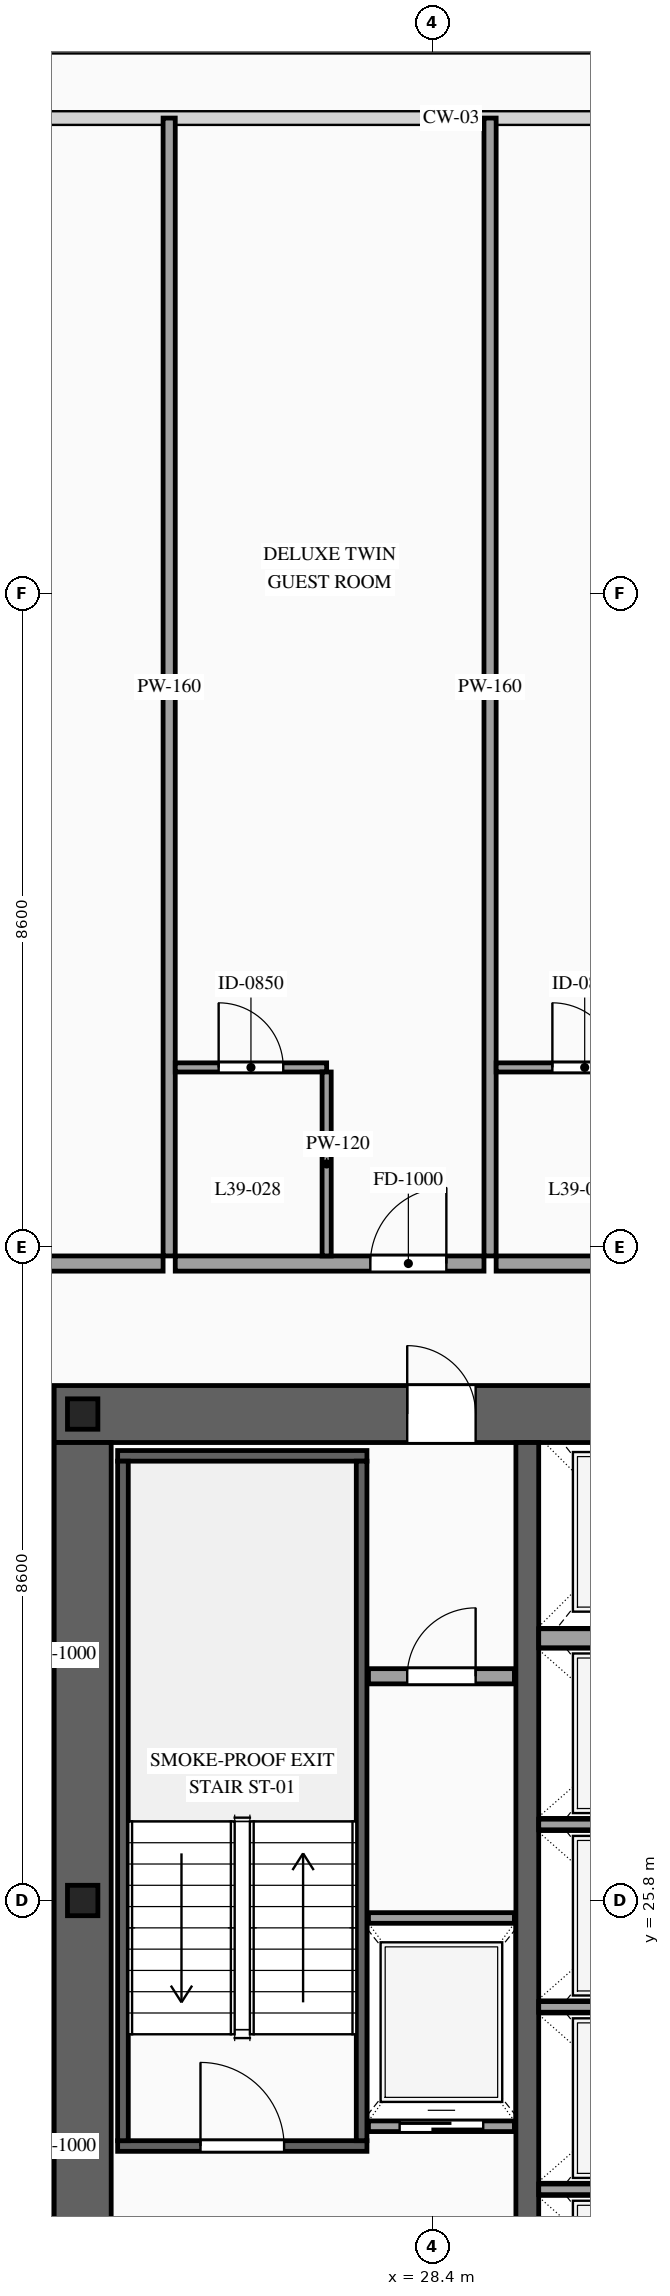
"""IFC4 building model, lengths in metres.
Left out: names, types, materials, properties, quantities, classifications, styles, units other than length and angle.
Written with IfcOpenShell. Run it as: python <this file> out.ifc"""

import sys

from ifc_helpers import new_model, si_unit, direction, frame, frame_2d, origin, origin_2d, place, context, subcontext, project, spatial, rectangle, i_section, extrude, source, transform, mapped, element, fill, save


model = new_model("IFC4")
c1 = context("Model", 3, precision=1e-05, world=origin(), true_north=direction((0.0, 1.0)))
c2 = subcontext(c1, "Body", "Model", "MODEL_VIEW")
j1 = project(units=[si_unit("LENGTHUNIT", "METRE"), si_unit("PLANEANGLEUNIT", "RADIAN")], contexts=[c1])
p1 = place(None, origin())
s1 = spatial("IfcSite", under=j1, at=p1, CompositionType="ELEMENT")
p2 = place(p1, origin())
s2 = spatial("IfcBuilding", under=s1, at=p2, CompositionType="ELEMENT")
p3 = place(p2, frame((0.0, 0.0, 148.8)))
s3 = spatial("IfcBuildingStorey", under=s2, at=p3, CompositionType="ELEMENT", Elevation=148.8)
p4 = place(p3, frame((23.425, 32.2, 0.0), z_axis=(0.0, 0.0, 1.0), x_axis=(1.0, 0.0, 0.0)))
e1 = element("IfcWall", 1, at=p4, inside=s3, PredefinedType="SHEAR", context=c2, shape_type="SweptSolid", body=[
    extrude(rectangle(XDim=27.15, YDim=0.75, at=frame_2d((13.575, 0.0))), origin(), (0.0, 0.0, 1.0), 3.6),
])
p5 = place(p4, frame((4.645, 0.0, 0.0)))
e2 = element("IfcOpeningElement", 2, at=p5, cuts=e1, PredefinedType="OPENING", context=c2, shape_type="SweptSolid", body=[
    extrude(rectangle(XDim=0.9, YDim=2.15, at=frame_2d((0.45, 1.075))), frame((0.0, 0.39, 0.0), z_axis=(0.0, -1.0, 0.0), x_axis=(1.0, 0.0, 0.0)), (0.0, 0.0, 1.0), 0.78),
])
p6 = place(p4, frame((9.925, 0.0, 0.0)))
e3 = element("IfcOpeningElement", 3, at=p6, cuts=e1, PredefinedType="OPENING", context=c2, shape_type="SweptSolid", body=[
    extrude(rectangle(XDim=1.1, YDim=2.2, at=frame_2d((0.55, 1.1))), frame((0.0, 0.39, 0.0), z_axis=(0.0, -1.0, 0.0), x_axis=(1.0, 0.0, 0.0)), (0.0, 0.0, 1.0), 0.78),
])
p7 = place(p4, frame((15.775, 0.0, 0.0)))
e4 = element("IfcOpeningElement", 4, at=p7, cuts=e1, PredefinedType="OPENING", context=c2, shape_type="SweptSolid", body=[
    extrude(rectangle(XDim=1.1, YDim=2.2, at=frame_2d((0.55, 1.1))), frame((0.0, 0.39, 0.0), z_axis=(0.0, -1.0, 0.0), x_axis=(1.0, 0.0, 0.0)), (0.0, 0.0, 1.0), 0.78),
])
p8 = place(p4, frame((19.745, 0.0, 0.0)))
e5 = element("IfcOpeningElement", 5, at=p8, cuts=e1, PredefinedType="OPENING", context=c2, shape_type="SweptSolid", body=[
    extrude(rectangle(XDim=0.9, YDim=2.15, at=frame_2d((0.45, 1.075))), frame((0.0, 0.39, 0.0), z_axis=(0.0, -1.0, 0.0), x_axis=(1.0, 0.0, 0.0)), (0.0, 0.0, 1.0), 0.78),
])
m1 = source(origin(), c2, "Body", "SweptSolid", [
    extrude(rectangle(XDim=12.05, YDim=0.75, at=frame_2d((6.025, 0.0))), origin(), (0.0, 0.0, 1.0), 3.6),
])
p9 = place(p3, frame((23.8, 19.775, 0.0), z_axis=(0.0, 0.0, 1.0), x_axis=(0.0, 1.0, 0.0)))
e6 = element("IfcWall", 6, at=p9, inside=s3, PredefinedType="SHEAR", context=c2, shape_type="MappedRepresentation", body=[
    mapped(m1, transform((0.0, 0.0, 0.0), scale=1.0)),
])
m2 = source(origin(), c2, "Body", "SweptSolid", [
    extrude(rectangle(XDim=12.05, YDim=0.3, at=frame_2d((6.025, 0.0))), origin(), (0.0, 0.0, 1.0), 3.6),
])
p10 = place(p3, frame((29.65, 19.775, 0.0), z_axis=(0.0, 0.0, 1.0), x_axis=(0.0, 1.0, 0.0)))
e7 = element("IfcWall", 7, at=p10, inside=s3, PredefinedType="SOLIDWALL", context=c2, shape_type="MappedRepresentation", body=[
    mapped(m2, transform((0.0, 0.0, 0.0), scale=1.0)),
])
m3 = source(origin(), c2, "Body", "SweptSolid", [
    extrude(i_section(OverallWidth=0.4, OverallDepth=0.4, WebThickness=0.013, FlangeThickness=0.021, at=origin_2d()), origin(), (0.0, 0.0, 1.0), 3.6),
])
for number, where, z_axis, x_axis in (
    (8, (23.8, 25.8, 0.0), (0.0, 0.0, 1.0), (1.0, 0.0, 0.0)),
    (9, (23.8, 32.2, 0.0), (0.0, 0.0, 1.0), (1.0, 0.0, 0.0)),
):
    element("IfcColumn", number, at=place(p3, frame(where, z_axis=z_axis, x_axis=x_axis)), inside=s3, PredefinedType="COLUMN", context=c2, shape_type="MappedRepresentation", body=[
        mapped(m3, transform((0.0, 0.0, 0.0), scale=1.0)),
    ])
p11 = place(p3, frame((27.56, 22.83, 0.0), z_axis=(0.0, 0.0, 1.0), x_axis=(1.0, 0.0, 0.0)))
e10 = element("IfcWall", 10, at=p11, inside=s3, PredefinedType="SOLIDWALL", context=c2, shape_type="SweptSolid", body=[
    extrude(rectangle(XDim=1.92, YDim=0.14, at=frame_2d((0.96, 0.0))), origin(), (0.0, 0.0, 1.0), 3.38),
])
p12 = place(p11, frame((0.41, 0.0, 0.0)))
e11 = element("IfcOpeningElement", 11, at=p12, cuts=e10, PredefinedType="OPENING", context=c2, shape_type="SweptSolid", body=[
    extrude(rectangle(XDim=1.1, YDim=2.2, at=frame_2d((0.55, 1.1))), frame((0.0, 0.085, 0.0), z_axis=(0.0, -1.0, 0.0), x_axis=(1.0, 0.0, 0.0)), (0.0, 0.0, 1.0), 0.17),
])
m4 = source(origin(), c2, "Body", "SweptSolid", [
    extrude(rectangle(XDim=1.92, YDim=0.14, at=frame_2d((0.96, 0.0))), origin(), (0.0, 0.0, 1.0), 3.38),
])
p13 = place(p3, frame((27.56, 25.57, 0.0), z_axis=(0.0, 0.0, 1.0), x_axis=(1.0, 0.0, 0.0)))
e12 = element("IfcWall", 12, at=p13, inside=s3, PredefinedType="SOLIDWALL", context=c2, shape_type="MappedRepresentation", body=[
    mapped(m4, transform((0.0, 0.0, 0.0), scale=1.0)),
])
m5 = source(origin(), c2, "Body", "SweptSolid", [
    extrude(rectangle(XDim=2.5, YDim=0.14, at=frame_2d((1.25, 0.0))), origin(), (0.0, 0.0, 1.0), 3.38),
])
for number, where, z_axis, x_axis in (
    (13, (29.8, 22.0, 0.0), (0.0, 0.0, 1.0), (1.0, 0.0, 0.0)),
    (14, (29.8, 24.4, 0.0), (0.0, 0.0, 1.0), (1.0, 0.0, 0.0)),
    (15, (29.8, 26.8, 0.0), (0.0, 0.0, 1.0), (1.0, 0.0, 0.0)),
):
    element("IfcWall", number, at=place(p3, frame(where, z_axis=z_axis, x_axis=x_axis)), inside=s3, PredefinedType="SOLIDWALL", context=c2, shape_type="MappedRepresentation", body=[
        mapped(m5, transform((0.0, 0.0, 0.0), scale=1.0)),
    ])
m6 = source(origin(), c2, "Body", "SweptSolid", [
    extrude(rectangle(XDim=2.5, YDim=0.25, at=frame_2d((1.25, 0.0))), origin(), (0.0, 0.0, 1.0), 3.38),
])
p14 = place(p3, frame((29.8, 29.25, 0.0), z_axis=(0.0, 0.0, 1.0), x_axis=(1.0, 0.0, 0.0)))
e16 = element("IfcWall", 16, at=p14, inside=s3, PredefinedType="SOLIDWALL", context=c2, shape_type="MappedRepresentation", body=[
    mapped(m6, transform((0.0, 0.0, 0.0), scale=1.0)),
])
p15 = place(p3, frame((24.26, 22.57, 0.0), z_axis=(0.0, 0.0, 1.0), x_axis=(1.0, 0.0, 0.0)))
e17 = element("IfcWall", 17, at=p15, inside=s3, PredefinedType="SOLIDWALL", context=c2, shape_type="SweptSolid", body=[
    extrude(rectangle(XDim=3.28, YDim=0.14, at=frame_2d((1.64, 0.0))), origin(), (0.0, 0.0, 1.0), 3.38),
])
p16 = place(p15, frame((1.09, 0.0, 0.0)))
e18 = element("IfcOpeningElement", 18, at=p16, cuts=e17, PredefinedType="OPENING", context=c2, shape_type="SweptSolid", body=[
    extrude(rectangle(XDim=1.1, YDim=2.2, at=frame_2d((0.55, 1.1))), frame((0.0, 0.085, 0.0), z_axis=(0.0, -1.0, 0.0), x_axis=(1.0, 0.0, 0.0)), (0.0, 0.0, 1.0), 0.17),
])
m7 = source(origin(), c2, "Body", "SweptSolid", [
    extrude(rectangle(XDim=3.28, YDim=0.14, at=frame_2d((1.64, 0.0))), origin(), (0.0, 0.0, 1.0), 3.38),
])
p17 = place(p3, frame((24.26, 31.65, 0.0), z_axis=(0.0, 0.0, 1.0), x_axis=(1.0, 0.0, 0.0)))
e19 = element("IfcWall", 19, at=p17, inside=s3, PredefinedType="SOLIDWALL", context=c2, shape_type="MappedRepresentation", body=[
    mapped(m7, transform((0.0, 0.0, 0.0), scale=1.0)),
])
m8 = source(origin(), c2, "Body", "SweptSolid", [
    extrude(rectangle(XDim=8.94, YDim=0.14, at=frame_2d((4.47, 0.0))), origin(), (0.0, 0.0, 1.0), 3.38),
])
for number, where, z_axis, x_axis in (
    (20, (24.33, 22.64, 0.0), (0.0, 0.0, 1.0), (0.0, 1.0, 0.0)),
    (21, (27.47, 22.64, 0.0), (0.0, 0.0, 1.0), (0.0, 1.0, 0.0)),
):
    element("IfcWall", number, at=place(p3, frame(where, z_axis=z_axis, x_axis=x_axis)), inside=s3, PredefinedType="SOLIDWALL", context=c2, shape_type="MappedRepresentation", body=[
        mapped(m8, transform((0.0, 0.0, 0.0), scale=1.0)),
    ])
p18 = place(p3, frame((27.56, 28.75, 0.0), z_axis=(0.0, 0.0, 1.0), x_axis=(1.0, 0.0, 0.0)))
e22 = element("IfcWall", 22, at=p18, inside=s3, PredefinedType="PARTITIONING", context=c2, shape_type="SweptSolid", body=[
    extrude(rectangle(XDim=1.92, YDim=0.2, at=frame_2d((0.96, 0.0))), origin(), (0.0, 0.0, 1.0), 3.38),
])
p19 = place(p18, frame((0.51, 0.0, 0.0)))
e23 = element("IfcOpeningElement", 23, at=p19, cuts=e22, PredefinedType="OPENING", context=c2, shape_type="SweptSolid", body=[
    extrude(rectangle(XDim=0.9, YDim=2.15, at=frame_2d((0.45, 1.075))), frame((0.0, 0.115, 0.0), z_axis=(0.0, -1.0, 0.0), x_axis=(1.0, 0.0, 0.0)), (0.0, 0.0, 1.0), 0.23),
])
p20 = place(p3, frame((16.44, 34.18, 0.0), z_axis=(0.0, 0.0, 1.0), x_axis=(1.0, 0.0, 0.0)))
e24 = element("IfcWall", 24, at=p20, inside=s3, PredefinedType="PARTITIONING", context=c2, shape_type="SweptSolid", body=[
    extrude(rectangle(XDim=8.418, YDim=0.2, at=frame_2d((4.209, 0.0))), origin(), (0.0, 0.0, 1.0), 3.38),
])
p21 = place(p20, frame((4.914, 0.0, 0.0)))
e25 = element("IfcOpeningElement", 25, at=p21, cuts=e24, PredefinedType="OPENING", context=c2, shape_type="SweptSolid", body=[
    extrude(rectangle(XDim=1.0, YDim=2.2, at=frame_2d((0.5, 1.1))), frame((0.0, 0.115, 0.0), z_axis=(0.0, -1.0, 0.0), x_axis=(1.0, 0.0, 0.0)), (0.0, 0.0, 1.0), 0.23),
])
m9 = source(origin(), c2, "Body", "SweptSolid", [
    extrude(rectangle(XDim=14.97, YDim=0.16, at=frame_2d((7.485, 0.0))), origin(), (0.0, 0.0, 1.0), 3.38),
])
p22 = place(p3, frame((24.938, 34.28, 0.0), z_axis=(0.0, 0.0, 1.0), x_axis=(0.0, 1.0, 0.0)))
e26 = element("IfcWall", 26, at=p22, inside=s3, PredefinedType="PARTITIONING", context=c2, shape_type="MappedRepresentation", body=[
    mapped(m9, transform((0.0, 0.0, 0.0), scale=1.0)),
])
p23 = place(p3, frame((25.018, 34.18, 0.0), z_axis=(0.0, 0.0, 1.0), x_axis=(1.0, 0.0, 0.0)))
e27 = element("IfcWall", 27, at=p23, inside=s3, PredefinedType="PARTITIONING", context=c2, shape_type="SweptSolid", body=[
    extrude(rectangle(XDim=4.062, YDim=0.2, at=frame_2d((2.031, 0.0))), origin(), (0.0, 0.0, 1.0), 3.38),
])
p24 = place(p23, frame((2.567, 0.0, 0.0)))
e28 = element("IfcOpeningElement", 28, at=p24, cuts=e27, PredefinedType="OPENING", context=c2, shape_type="SweptSolid", body=[
    extrude(rectangle(XDim=1.0, YDim=2.2, at=frame_2d((0.5, 1.1))), frame((0.0, 0.115, 0.0), z_axis=(0.0, -1.0, 0.0), x_axis=(1.0, 0.0, 0.0)), (0.0, 0.0, 1.0), 0.23),
])
p25 = place(p3, frame((29.16, 34.28, 0.0), z_axis=(0.0, 0.0, 1.0), x_axis=(0.0, 1.0, 0.0)))
e29 = element("IfcWall", 29, at=p25, inside=s3, PredefinedType="PARTITIONING", context=c2, shape_type="MappedRepresentation", body=[
    mapped(m9, transform((0.0, 0.0, 0.0), scale=1.0)),
])
p26 = place(p3, frame((25.018, 36.76, 0.0), z_axis=(0.0, 0.0, 1.0), x_axis=(1.0, 0.0, 0.0)))
e30 = element("IfcWall", 30, at=p26, inside=s3, PredefinedType="PARTITIONING", context=c2, shape_type="SweptSolid", body=[
    extrude(rectangle(XDim=1.992, YDim=0.12, at=frame_2d((0.996, 0.0))), origin(), (0.0, 0.0, 1.0), 3.38),
])
p27 = place(p26, frame((0.571, 0.0, 0.0)))
e31 = element("IfcOpeningElement", 31, at=p27, cuts=e30, PredefinedType="OPENING", context=c2, shape_type="SweptSolid", body=[
    extrude(rectangle(XDim=0.85, YDim=2.1, at=frame_2d((0.425, 1.05))), frame((0.0, 0.075, 0.0), z_axis=(0.0, -1.0, 0.0), x_axis=(1.0, 0.0, 0.0)), (0.0, 0.0, 1.0), 0.15),
])
m10 = source(origin(), c2, "Body", "SweptSolid", [
    extrude(rectangle(XDim=2.42, YDim=0.12, at=frame_2d((1.21, 0.0))), origin(), (0.0, 0.0, 1.0), 3.38),
])
p28 = place(p3, frame((27.01, 34.28, 0.0), z_axis=(0.0, 0.0, 1.0), x_axis=(0.0, 1.0, 0.0)))
e32 = element("IfcWall", 32, at=p28, inside=s3, PredefinedType="PARTITIONING", context=c2, shape_type="MappedRepresentation", body=[
    mapped(m10, transform((0.0, 0.0, 0.0), scale=1.0)),
])
p29 = place(p3, frame((29.24, 34.18, 0.0), z_axis=(0.0, 0.0, 1.0), x_axis=(1.0, 0.0, 0.0)))
e33 = element("IfcWall", 33, at=p29, inside=s3, PredefinedType="PARTITIONING", context=c2, shape_type="SweptSolid", body=[
    extrude(rectangle(XDim=9.325, YDim=0.2, at=frame_2d((4.663, 0.0))), origin(), (0.0, 0.0, 1.0), 3.38),
])
p30 = place(p29, frame((5.368, 0.0, 0.0)))
e34 = element("IfcOpeningElement", 34, at=p30, cuts=e33, PredefinedType="OPENING", context=c2, shape_type="SweptSolid", body=[
    extrude(rectangle(XDim=1.0, YDim=2.2, at=frame_2d((0.5, 1.1))), frame((0.0, 0.115, 0.0), z_axis=(0.0, -1.0, 0.0), x_axis=(1.0, 0.0, 0.0)), (0.0, 0.0, 1.0), 0.23),
])
p31 = place(p3, frame((29.24, 36.76, 0.0), z_axis=(0.0, 0.0, 1.0), x_axis=(1.0, 0.0, 0.0)))
e35 = element("IfcWall", 35, at=p31, inside=s3, PredefinedType="PARTITIONING", context=c2, shape_type="SweptSolid", body=[
    extrude(rectangle(XDim=2.33, YDim=0.12, at=frame_2d((1.165, 0.0))), origin(), (0.0, 0.0, 1.0), 3.38),
])
p32 = place(p31, frame((0.74, 0.0, 0.0)))
e36 = element("IfcOpeningElement", 36, at=p32, cuts=e35, PredefinedType="OPENING", context=c2, shape_type="SweptSolid", body=[
    extrude(rectangle(XDim=0.85, YDim=2.1, at=frame_2d((0.425, 1.05))), frame((0.0, 0.075, 0.0), z_axis=(0.0, -1.0, 0.0), x_axis=(1.0, 0.0, 0.0)), (0.0, 0.0, 1.0), 0.15),
])
m11 = source(origin(), c2, "Body", "SweptSolid", [
    extrude(rectangle(XDim=1.1, YDim=2.2, at=frame_2d((0.55, 1.1))), frame((0.0, 0.025, 0.0), z_axis=(0.0, -1.0, 0.0), x_axis=(1.0, 0.0, 0.0)), (0.0, 0.0, 1.0), 0.05),
])
p33 = place(p12, origin())
e37 = element("IfcDoor", 37, at=p33, inside=s3, OperationType="SLIDING_TO_LEFT", PredefinedType="DOOR", context=c2, shape_type="MappedRepresentation", body=[
    mapped(m11, transform((0.0, 0.0, 0.0), scale=1.0)),
])
fill(e11, e37)
m12 = source(origin(), c2, "Body", "SweptSolid", [
    extrude(rectangle(XDim=1.1, YDim=2.2, at=frame_2d((0.55, 1.1))), frame((0.0, 0.025, 0.0), z_axis=(0.0, -1.0, 0.0), x_axis=(1.0, 0.0, 0.0)), (0.0, 0.0, 1.0), 0.05),
])
p34 = place(p16, origin())
e38 = element("IfcDoor", 38, at=p34, inside=s3, OperationType="SINGLE_SWING_LEFT", PredefinedType="DOOR", context=c2, shape_type="MappedRepresentation", body=[
    mapped(m12, transform((0.0, 0.0, 0.0), scale=1.0)),
])
fill(e18, e38)
m13 = source(origin(), c2, "Body", "SweptSolid", [
    extrude(rectangle(XDim=0.9, YDim=2.15, at=frame_2d((0.45, 1.075))), frame((0.0, 0.025, 0.0), z_axis=(0.0, -1.0, 0.0), x_axis=(1.0, 0.0, 0.0)), (0.0, 0.0, 1.0), 0.05),
])
p35 = place(p5, origin())
e39 = element("IfcDoor", 39, at=p35, inside=s3, OperationType="SINGLE_SWING_LEFT", PredefinedType="DOOR", context=c2, shape_type="MappedRepresentation", body=[
    mapped(m13, transform((0.0, 0.0, 0.0), scale=1.0)),
])
fill(e2, e39)
p36 = place(p19, origin())
e40 = element("IfcDoor", 40, at=p36, inside=s3, OperationType="SINGLE_SWING_RIGHT", PredefinedType="DOOR", context=c2, shape_type="MappedRepresentation", body=[
    mapped(m13, transform((0.0, 0.0, 0.0), scale=1.0)),
])
fill(e23, e40)
m14 = source(origin(), c2, "Body", "SweptSolid", [
    extrude(rectangle(XDim=1.0, YDim=2.2, at=frame_2d((0.5, 1.1))), frame((0.0, 0.025, 0.0), z_axis=(0.0, -1.0, 0.0), x_axis=(1.0, 0.0, 0.0)), (0.0, 0.0, 1.0), 0.05),
])
p37 = place(p24, origin())
e41 = element("IfcDoor", 41, at=p37, inside=s3, OperationType="SINGLE_SWING_RIGHT", PredefinedType="DOOR", context=c2, shape_type="MappedRepresentation", body=[
    mapped(m14, transform((0.0, 0.0, 0.0), scale=1.0)),
])
fill(e28, e41)
m15 = source(origin(), c2, "Body", "SweptSolid", [
    extrude(rectangle(XDim=0.85, YDim=2.1, at=frame_2d((0.425, 1.05))), frame((0.0, 0.025, 0.0), z_axis=(0.0, -1.0, 0.0), x_axis=(1.0, 0.0, 0.0)), (0.0, 0.0, 1.0), 0.05),
])
p38 = place(p27, origin())
e42 = element("IfcDoor", 42, at=p38, inside=s3, OperationType="SINGLE_SWING_LEFT", PredefinedType="DOOR", context=c2, shape_type="MappedRepresentation", body=[
    mapped(m15, transform((0.0, 0.0, 0.0), scale=1.0)),
])
fill(e31, e42)
p39 = place(p32, origin())
e43 = element("IfcDoor", 43, at=p39, inside=s3, OperationType="SINGLE_SWING_LEFT", PredefinedType="DOOR", context=c2, shape_type="MappedRepresentation", body=[
    mapped(m15, transform((0.0, 0.0, 0.0), scale=1.0)),
])
fill(e36, e43)
save(model, sys.argv[1])
